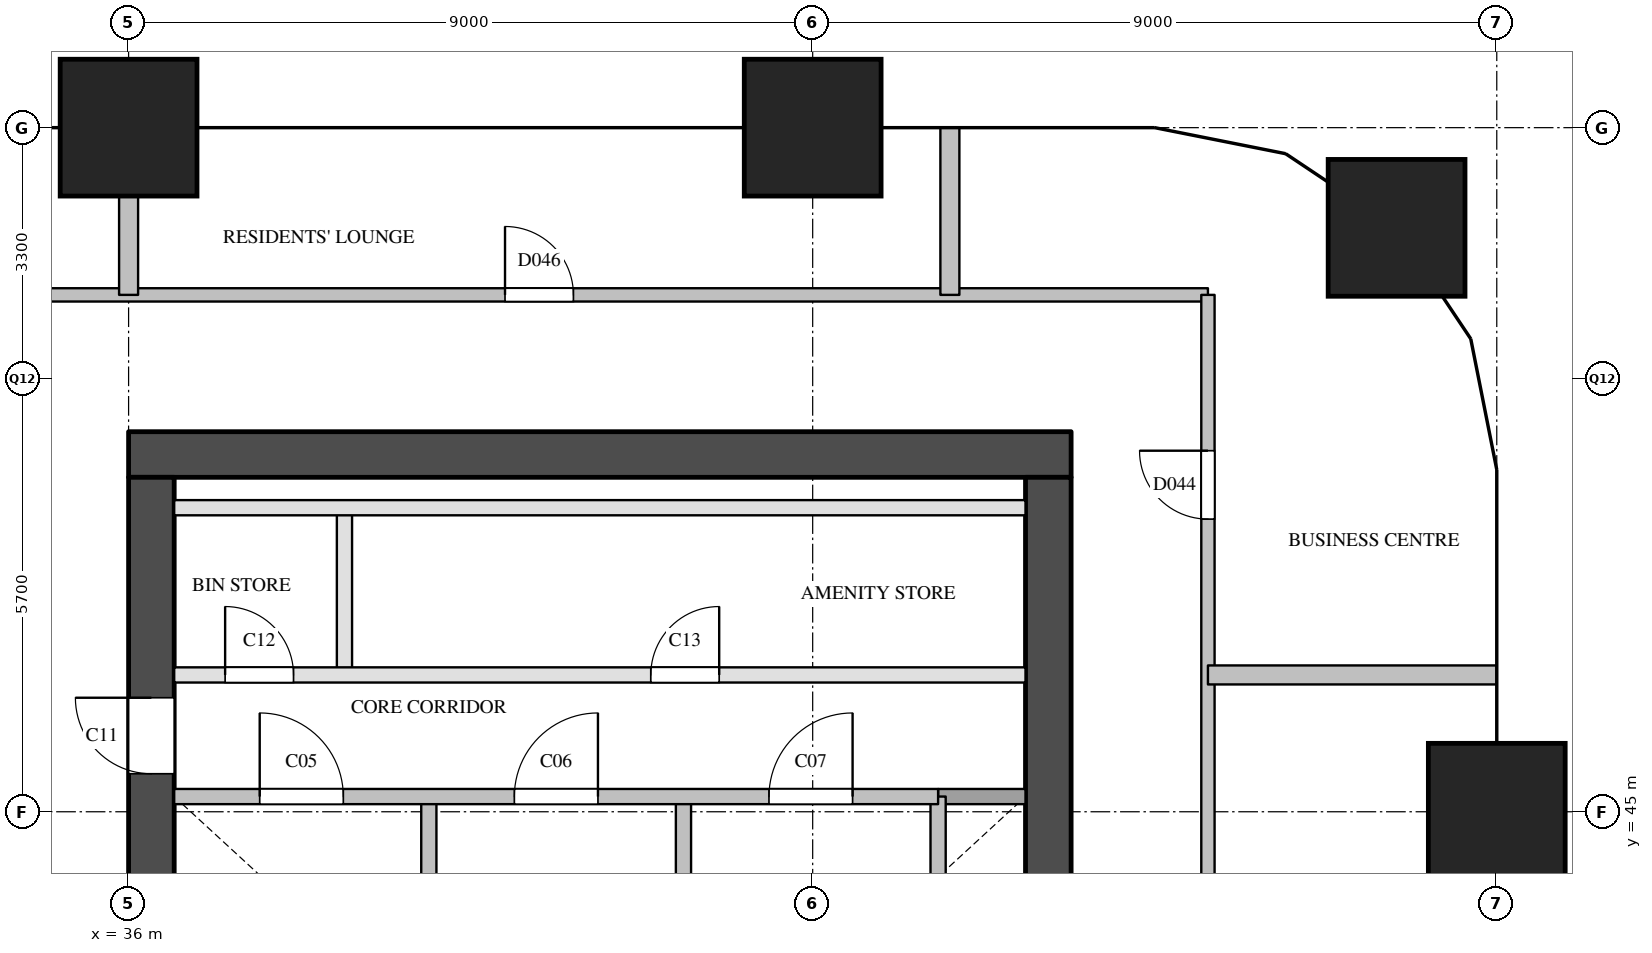
"""IFC4 building model, lengths in metres.
Left out: names, types, materials, properties, quantities, classifications, styles, units other than length and angle.
Written with IfcOpenShell. Run it as: python <this file> out.ifc"""

import sys

from ifc_helpers import new_model, si_unit, direction, frame, frame_2d, origin, origin_2d, place, context, subcontext, project, spatial, rectangle, extrude, element, fill, save


model = new_model("IFC4")
c1 = context("Model", 3, precision=1e-05, world=origin(), true_north=direction((0.0, 1.0)))
c2 = subcontext(c1, "Body", "Model", "MODEL_VIEW")
j1 = project(units=[si_unit("LENGTHUNIT", "METRE"), si_unit("PLANEANGLEUNIT", "RADIAN")], contexts=[c1])
p1 = place(None, origin())
s1 = spatial("IfcSite", under=j1, at=p1, CompositionType="ELEMENT")
p2 = place(p1, origin())
s2 = spatial("IfcBuilding", under=s1, at=p2, CompositionType="ELEMENT")
p3 = place(p2, frame((0.0, 0.0, 57.6)))
s3 = spatial("IfcBuildingStorey", under=s2, at=p3, CompositionType="ELEMENT", Elevation=57.6)
for number, where, z_axis, x_axis in (
    (1, (36.0, 54.0, 0.0), (0.0, 0.0, 1.0), (1.0, 0.0, 0.0)),
    (2, (45.0, 54.0, 0.0), (0.0, 0.0, 1.0), (1.0, 0.0, 0.0)),
    (3, (54.0, 45.0, 0.0), (0.0, 0.0, 1.0), (1.0, 0.0, 0.0)),
    (4, (52.682, 52.682, 0.0), (0.0, 0.0, 1.0), (1.0, 0.0, 0.0)),
):
    element("IfcColumn", number, at=place(p3, frame(where, z_axis=z_axis, x_axis=x_axis)), inside=s3, PredefinedType="COLUMN", context=c2, shape_type="SweptSolid", body=[
        extrude(rectangle(XDim=1.8, YDim=1.8, at=origin_2d()), origin(), (0.0, 0.0, 1.0), 3.8),
    ])
p4 = place(p3, frame((36.0, 49.7, 0.0), z_axis=(0.0, 0.0, 1.0), x_axis=(1.0, 0.0, 0.0)))
e5 = element("IfcWall", 5, at=p4, inside=s3, PredefinedType="SHEAR", context=c2, shape_type="SweptSolid", body=[
    extrude(rectangle(XDim=12.4, YDim=0.6, at=frame_2d((6.2, 0.0))), origin(), (0.0, 0.0, 1.0), 3.5),
])
p5 = place(p3, frame((36.3, 29.1, 0.0), z_axis=(0.0, 0.0, 1.0), x_axis=(0.0, 1.0, 0.0)))
e6 = element("IfcWall", 6, at=p5, inside=s3, PredefinedType="SHEAR", context=c2, shape_type="SweptSolid", body=[
    extrude(rectangle(XDim=20.3, YDim=0.6, at=frame_2d((10.15, 0.0))), origin(), (0.0, 0.0, 1.0), 3.5),
])
p6 = place(p5, frame((3.6, 0.0, 0.0)))
e7 = element("IfcOpeningElement", 7, at=p6, cuts=e6, PredefinedType="OPENING", context=c2, shape_type="SweptSolid", body=[
    extrude(rectangle(XDim=1.8, YDim=2.1, at=frame_2d((0.9, 1.05))), frame((0.0, 0.31, 0.0), z_axis=(0.0, -1.0, 0.0), x_axis=(1.0, 0.0, 0.0)), (0.0, 0.0, 1.0), 0.62),
])
p7 = place(p5, frame((16.4, 0.0, 0.0)))
e8 = element("IfcOpeningElement", 8, at=p7, cuts=e6, PredefinedType="OPENING", context=c2, shape_type="SweptSolid", body=[
    extrude(rectangle(XDim=1.0, YDim=2.1, at=frame_2d((0.5, 1.05))), frame((0.0, 0.31, 0.0), z_axis=(0.0, -1.0, 0.0), x_axis=(1.0, 0.0, 0.0)), (0.0, 0.0, 1.0), 0.62),
])
p8 = place(p3, frame((48.1, 29.1, 0.0), z_axis=(0.0, 0.0, 1.0), x_axis=(0.0, 1.0, 0.0)))
e9 = element("IfcWall", 9, at=p8, inside=s3, PredefinedType="SHEAR", context=c2, shape_type="SweptSolid", body=[
    extrude(rectangle(XDim=20.3, YDim=0.6, at=frame_2d((10.15, 0.0))), origin(), (0.0, 0.0, 1.0), 3.5),
])
p9 = place(p8, frame((12.5, 0.0, 0.0)))
e10 = element("IfcOpeningElement", 10, at=p9, cuts=e9, PredefinedType="OPENING", context=c2, shape_type="SweptSolid", body=[
    extrude(rectangle(XDim=0.7, YDim=2.1, at=frame_2d((0.35, 1.05))), frame((0.0, 0.31, 0.0), z_axis=(0.0, -1.0, 0.0), x_axis=(1.0, 0.0, 0.0)), (0.0, 0.0, 1.0), 0.62),
])
p10 = place(p8, frame((3.9, 0.0, 0.0)))
e11 = element("IfcOpeningElement", 11, at=p10, cuts=e9, PredefinedType="OPENING", context=c2, shape_type="SweptSolid", body=[
    extrude(rectangle(XDim=1.8, YDim=2.1, at=frame_2d((0.9, 1.05))), frame((0.0, 0.31, 0.0), z_axis=(0.0, -1.0, 0.0), x_axis=(1.0, 0.0, 0.0)), (0.0, 0.0, 1.0), 0.62),
])
p11 = place(p3, frame((38.84, 46.8, 0.0), z_axis=(0.0, 0.0, 1.0), x_axis=(0.0, 1.0, 0.0)))
e12 = element("IfcWall", 12, at=p11, inside=s3, PredefinedType="PARTITIONING", context=c2, shape_type="SweptSolid", body=[
    extrude(rectangle(XDim=2.2, YDim=0.2, at=frame_2d((1.1, 0.0))), origin(), (0.0, 0.0, 1.0), 3.5),
])
for number, where, z_axis, x_axis in (
    (13, (39.95, 40.78, 0.0), (0.0, 0.0, 1.0), (0.0, 1.0, 0.0)),
    (14, (43.3, 40.78, 0.0), (0.0, 0.0, 1.0), (0.0, 1.0, 0.0)),
    (15, (46.65, 40.78, 0.0), (0.0, 0.0, 1.0), (0.0, 1.0, 0.0)),
):
    element("IfcWall", number, at=place(p3, frame(where, z_axis=z_axis, x_axis=x_axis)), inside=s3, PredefinedType="SOLIDWALL", context=c2, shape_type="SweptSolid", body=[
        extrude(rectangle(XDim=4.42, YDim=0.2, at=frame_2d((2.21, 0.0))), origin(), (0.0, 0.0, 1.0), 3.5),
    ])
p12 = place(p3, frame((46.65, 45.2, 0.0), z_axis=(0.0, 0.0, 1.0), x_axis=(1.0, 0.0, 0.0)))
e16 = element("IfcWall", 16, at=p12, inside=s3, PredefinedType="SOLIDWALL", context=c2, shape_type="SweptSolid", body=[
    extrude(rectangle(XDim=1.15, YDim=0.2, at=frame_2d((0.575, 0.0))), origin(), (0.0, 0.0, 1.0), 3.5),
])
p13 = place(p3, frame((36.6, 45.2, 0.0), z_axis=(0.0, 0.0, 1.0), x_axis=(1.0, 0.0, 0.0)))
e17 = element("IfcWall", 17, at=p13, inside=s3, PredefinedType="SOLIDWALL", context=c2, shape_type="SweptSolid", body=[
    extrude(rectangle(XDim=10.05, YDim=0.2, at=frame_2d((5.025, 0.0))), origin(), (0.0, 0.0, 1.0), 3.5),
])
p14 = place(p13, frame((1.125, 0.0, 0.0)))
e18 = element("IfcOpeningElement", 18, at=p14, cuts=e17, PredefinedType="OPENING", context=c2, shape_type="SweptSolid", body=[
    extrude(rectangle(XDim=1.1, YDim=2.1, at=frame_2d((0.55, 1.05))), frame((0.0, 0.11, 0.0), z_axis=(0.0, -1.0, 0.0), x_axis=(1.0, 0.0, 0.0)), (0.0, 0.0, 1.0), 0.22),
])
p15 = place(p13, frame((4.475, 0.0, 0.0)))
e19 = element("IfcOpeningElement", 19, at=p15, cuts=e17, PredefinedType="OPENING", context=c2, shape_type="SweptSolid", body=[
    extrude(rectangle(XDim=1.1, YDim=2.1, at=frame_2d((0.55, 1.05))), frame((0.0, 0.11, 0.0), z_axis=(0.0, -1.0, 0.0), x_axis=(1.0, 0.0, 0.0)), (0.0, 0.0, 1.0), 0.22),
])
p16 = place(p13, frame((7.825, 0.0, 0.0)))
e20 = element("IfcOpeningElement", 20, at=p16, cuts=e17, PredefinedType="OPENING", context=c2, shape_type="SweptSolid", body=[
    extrude(rectangle(XDim=1.1, YDim=2.1, at=frame_2d((0.55, 1.05))), frame((0.0, 0.11, 0.0), z_axis=(0.0, -1.0, 0.0), x_axis=(1.0, 0.0, 0.0)), (0.0, 0.0, 1.0), 0.22),
])
p17 = place(p3, frame((36.6, 46.8, 0.0), z_axis=(0.0, 0.0, 1.0), x_axis=(1.0, 0.0, 0.0)))
e21 = element("IfcWall", 21, at=p17, inside=s3, PredefinedType="PARTITIONING", context=c2, shape_type="SweptSolid", body=[
    extrude(rectangle(XDim=11.2, YDim=0.2, at=frame_2d((5.6, 0.0))), origin(), (0.0, 0.0, 1.0), 3.5),
])
p18 = place(p17, frame((0.67, 0.0, 0.0)))
e22 = element("IfcOpeningElement", 22, at=p18, cuts=e21, PredefinedType="OPENING", context=c2, shape_type="SweptSolid", body=[
    extrude(rectangle(XDim=0.9, YDim=2.1, at=frame_2d((0.45, 1.05))), frame((0.0, 0.11, 0.0), z_axis=(0.0, -1.0, 0.0), x_axis=(1.0, 0.0, 0.0)), (0.0, 0.0, 1.0), 0.22),
])
p19 = place(p17, frame((6.27, 0.0, 0.0)))
e23 = element("IfcOpeningElement", 23, at=p19, cuts=e21, PredefinedType="OPENING", context=c2, shape_type="SweptSolid", body=[
    extrude(rectangle(XDim=0.9, YDim=2.1, at=frame_2d((0.45, 1.05))), frame((0.0, 0.11, 0.0), z_axis=(0.0, -1.0, 0.0), x_axis=(1.0, 0.0, 0.0)), (0.0, 0.0, 1.0), 0.22),
])
p20 = place(p3, frame((36.6, 49.0, 0.0), z_axis=(0.0, 0.0, 1.0), x_axis=(1.0, 0.0, 0.0)))
e24 = element("IfcWall", 24, at=p20, inside=s3, PredefinedType="PARTITIONING", context=c2, shape_type="SweptSolid", body=[
    extrude(rectangle(XDim=11.2, YDim=0.2, at=frame_2d((5.6, 0.0))), origin(), (0.0, 0.0, 1.0), 3.5),
])
p21 = place(p3, frame((34.2, 51.8, 0.0), z_axis=(0.0, 0.0, 1.0), x_axis=(1.0, 0.0, 0.0)))
e25 = element("IfcWall", 25, at=p21, inside=s3, PredefinedType="PARTITIONING", context=c2, shape_type="SweptSolid", body=[
    extrude(rectangle(XDim=16.0, YDim=0.175, at=frame_2d((8.0, 0.0))), origin(), (0.0, 0.0, 1.0), 3.5),
])
p22 = place(p21, frame((6.752, 0.0, 0.0)))
e26 = element("IfcOpeningElement", 26, at=p22, cuts=e25, PredefinedType="OPENING", context=c2, shape_type="SweptSolid", body=[
    extrude(rectangle(XDim=0.9, YDim=2.1, at=frame_2d((0.45, 1.05))), frame((0.0, 0.097, 0.0), z_axis=(0.0, -1.0, 0.0), x_axis=(1.0, 0.0, 0.0)), (0.0, 0.0, 1.0), 0.195),
])
p23 = place(p3, frame((50.2, 26.7, 0.0), z_axis=(0.0, 0.0, 1.0), x_axis=(0.0, 1.0, 0.0)))
e27 = element("IfcWall", 27, at=p23, inside=s3, PredefinedType="PARTITIONING", context=c2, shape_type="SweptSolid", body=[
    extrude(rectangle(XDim=25.1, YDim=0.175, at=frame_2d((12.55, 0.0))), origin(), (0.0, 0.0, 1.0), 2.5),
])
p24 = place(p23, frame((4.2, 0.0, 0.0)))
e28 = element("IfcOpeningElement", 28, at=p24, cuts=e27, PredefinedType="OPENING", context=c2, shape_type="SweptSolid", body=[
    extrude(rectangle(XDim=0.9, YDim=2.1, at=frame_2d((0.45, 1.05))), frame((0.0, 0.097, 0.0), z_axis=(0.0, -1.0, 0.0), x_axis=(1.0, 0.0, 0.0)), (0.0, 0.0, 1.0), 0.195),
])
p25 = place(p23, frame((14.25, 0.0, 0.0)))
e29 = element("IfcOpeningElement", 29, at=p25, cuts=e27, PredefinedType="OPENING", context=c2, shape_type="SweptSolid", body=[
    extrude(rectangle(XDim=0.9, YDim=2.1, at=frame_2d((0.45, 1.05))), frame((0.0, 0.097, 0.0), z_axis=(0.0, -1.0, 0.0), x_axis=(1.0, 0.0, 0.0)), (0.0, 0.0, 1.0), 0.195),
])
p26 = place(p23, frame((22.15, 0.0, 0.0)))
e30 = element("IfcOpeningElement", 30, at=p26, cuts=e27, PredefinedType="OPENING", context=c2, shape_type="SweptSolid", body=[
    extrude(rectangle(XDim=0.9, YDim=2.1, at=frame_2d((0.45, 1.05))), frame((0.0, 0.097, 0.0), z_axis=(0.0, -1.0, 0.0), x_axis=(1.0, 0.0, 0.0)), (0.0, 0.0, 1.0), 0.195),
])
p27 = place(p3, frame((50.2, 46.8, 0.0), z_axis=(0.0, 0.0, 1.0), x_axis=(1.0, 0.0, 0.0)))
e31 = element("IfcWall", 31, at=p27, inside=s3, PredefinedType="PARTITIONING", context=c2, shape_type="SweptSolid", body=[
    extrude(rectangle(XDim=3.8, YDim=0.25, at=frame_2d((1.9, 0.0))), origin(), (0.0, 0.0, 1.0), 2.5),
])
p28 = place(p3, frame((36.0, 51.8, 0.0), z_axis=(0.0, 0.0, 1.0), x_axis=(0.0, 1.0, 0.0)))
e32 = element("IfcWall", 32, at=p28, inside=s3, PredefinedType="PARTITIONING", context=c2, shape_type="SweptSolid", body=[
    extrude(rectangle(XDim=2.2, YDim=0.25, at=frame_2d((1.1, 0.0))), origin(), (0.0, 0.0, 1.0), 3.5),
])
p29 = place(p3, frame((46.805, 51.8, 0.0), z_axis=(0.0, 0.0, 1.0), x_axis=(0.0, 1.0, 0.0)))
e33 = element("IfcWall", 33, at=p29, inside=s3, PredefinedType="PARTITIONING", context=c2, shape_type="SweptSolid", body=[
    extrude(rectangle(XDim=2.2, YDim=0.25, at=frame_2d((1.1, 0.0))), origin(), (0.0, 0.0, 1.0), 2.5),
])
p30 = place(p14, origin())
e34 = element("IfcDoor", 34, at=p30, inside=s3, OperationType="SINGLE_SWING_LEFT", PredefinedType="DOOR", context=c2, shape_type="SweptSolid", body=[
    extrude(rectangle(XDim=1.1, YDim=2.1, at=frame_2d((0.55, 1.05))), frame((0.0, 0.025, 0.0), z_axis=(0.0, -1.0, 0.0), x_axis=(1.0, 0.0, 0.0)), (0.0, 0.0, 1.0), 0.05),
])
fill(e18, e34)
p31 = place(p15, origin())
e35 = element("IfcDoor", 35, at=p31, inside=s3, OperationType="SINGLE_SWING_RIGHT", PredefinedType="DOOR", context=c2, shape_type="SweptSolid", body=[
    extrude(rectangle(XDim=1.1, YDim=2.1, at=frame_2d((0.55, 1.05))), frame((0.0, 0.025, 0.0), z_axis=(0.0, -1.0, 0.0), x_axis=(1.0, 0.0, 0.0)), (0.0, 0.0, 1.0), 0.05),
])
fill(e19, e35)
p32 = place(p16, origin())
e36 = element("IfcDoor", 36, at=p32, inside=s3, OperationType="SINGLE_SWING_RIGHT", PredefinedType="DOOR", context=c2, shape_type="SweptSolid", body=[
    extrude(rectangle(XDim=1.1, YDim=2.1, at=frame_2d((0.55, 1.05))), frame((0.0, 0.025, 0.0), z_axis=(0.0, -1.0, 0.0), x_axis=(1.0, 0.0, 0.0)), (0.0, 0.0, 1.0), 0.05),
])
fill(e20, e36)
p33 = place(p7, origin())
e37 = element("IfcDoor", 37, at=p33, inside=s3, OperationType="SINGLE_SWING_RIGHT", PredefinedType="DOOR", context=c2, shape_type="SweptSolid", body=[
    extrude(rectangle(XDim=1.0, YDim=2.1, at=frame_2d((0.5, 1.05))), frame((0.0, 0.025, 0.0), z_axis=(0.0, -1.0, 0.0), x_axis=(1.0, 0.0, 0.0)), (0.0, 0.0, 1.0), 0.05),
])
fill(e8, e37)
p34 = place(p18, origin())
e38 = element("IfcDoor", 38, at=p34, inside=s3, OperationType="SINGLE_SWING_LEFT", PredefinedType="DOOR", context=c2, shape_type="SweptSolid", body=[
    extrude(rectangle(XDim=0.9, YDim=2.1, at=frame_2d((0.45, 1.05))), frame((0.0, 0.025, 0.0), z_axis=(0.0, -1.0, 0.0), x_axis=(1.0, 0.0, 0.0)), (0.0, 0.0, 1.0), 0.05),
])
fill(e22, e38)
p35 = place(p19, origin())
e39 = element("IfcDoor", 39, at=p35, inside=s3, OperationType="SINGLE_SWING_RIGHT", PredefinedType="DOOR", context=c2, shape_type="SweptSolid", body=[
    extrude(rectangle(XDim=0.9, YDim=2.1, at=frame_2d((0.45, 1.05))), frame((0.0, 0.025, 0.0), z_axis=(0.0, -1.0, 0.0), x_axis=(1.0, 0.0, 0.0)), (0.0, 0.0, 1.0), 0.05),
])
fill(e23, e39)
p36 = place(p26, origin())
e40 = element("IfcDoor", 40, at=p36, inside=s3, OperationType="SINGLE_SWING_RIGHT", PredefinedType="DOOR", context=c2, shape_type="SweptSolid", body=[
    extrude(rectangle(XDim=0.9, YDim=2.1, at=frame_2d((0.45, 1.05))), frame((0.0, 0.025, 0.0), z_axis=(0.0, -1.0, 0.0), x_axis=(1.0, 0.0, 0.0)), (0.0, 0.0, 1.0), 0.05),
])
fill(e30, e40)
p37 = place(p22, origin())
e41 = element("IfcDoor", 41, at=p37, inside=s3, OperationType="SINGLE_SWING_LEFT", PredefinedType="DOOR", context=c2, shape_type="SweptSolid", body=[
    extrude(rectangle(XDim=0.9, YDim=2.1, at=frame_2d((0.45, 1.05))), frame((0.0, 0.025, 0.0), z_axis=(0.0, -1.0, 0.0), x_axis=(1.0, 0.0, 0.0)), (0.0, 0.0, 1.0), 0.05),
])
fill(e26, e41)
save(model, sys.argv[1])
